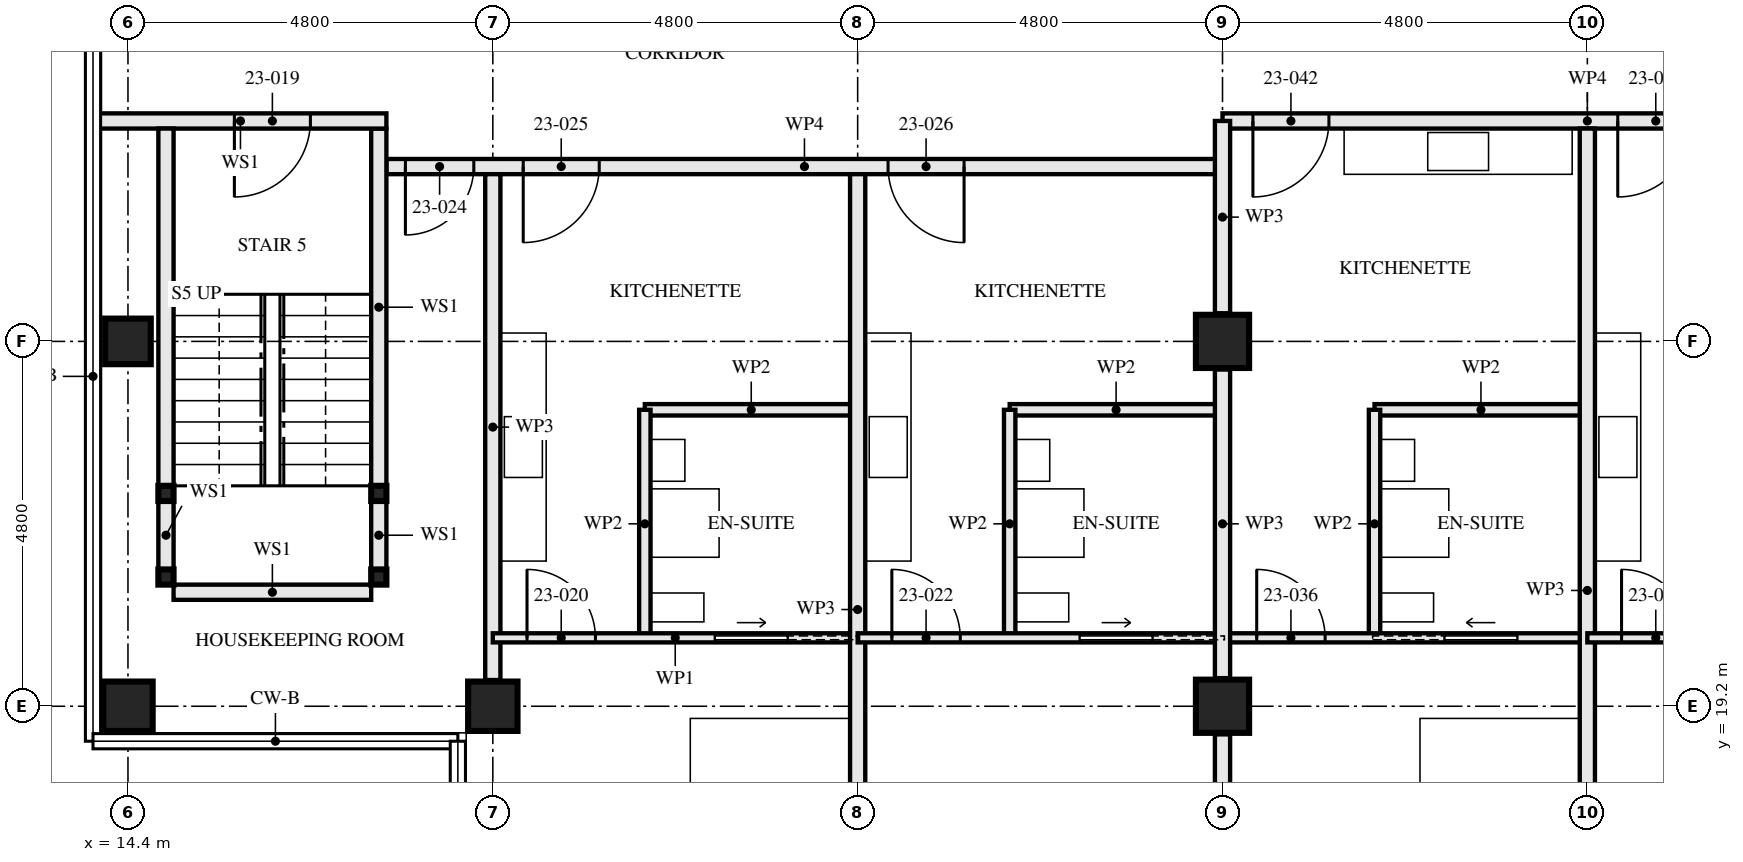
"""IFC4 building model, lengths in metres.
Left out: names, types, materials, properties, quantities, classifications, styles, units other than length and angle.
Written with IfcOpenShell. Run it as: python <this file> out.ifc"""

import sys

from ifc_helpers import new_model, si_unit, direction, frame, frame_2d, origin, origin_2d, place, context, subcontext, project, spatial, rectangle, hollow_rectangle, extrude, element, fill, save


model = new_model("IFC4")
c1 = context("Model", 3, precision=1e-05, world=origin(), true_north=direction((0.0, 1.0)))
c2 = subcontext(c1, "Body", "Model", "MODEL_VIEW")
j1 = project(units=[si_unit("LENGTHUNIT", "METRE"), si_unit("PLANEANGLEUNIT", "RADIAN")], contexts=[c1])
p1 = place(None, origin())
s1 = spatial("IfcSite", under=j1, at=p1, CompositionType="ELEMENT")
p2 = place(p1, origin())
s2 = spatial("IfcBuilding", under=s1, at=p2, CompositionType="ELEMENT")
p3 = place(p2, frame((0.0, 0.0, 87.5)))
s3 = spatial("IfcBuildingStorey", under=s2, at=p3, CompositionType="ELEMENT", Elevation=87.5)
p4 = place(p3, frame((14.4, 19.2, 0.0), z_axis=(0.0, 0.0, 1.0), x_axis=(0.0, 1.0, 0.0)))
e1 = element("IfcColumn", 1, at=p4, inside=s3, PredefinedType="COLUMN", context=c2, shape_type="SweptSolid", body=[
    extrude(hollow_rectangle(XDim=0.65, YDim=0.65, WallThickness=0.08, at=origin_2d()), origin(), (0.0, 0.0, 1.0), 3.5),
])
p5 = place(p3, frame((14.4, 24.0, 0.0), z_axis=(0.0, 0.0, 1.0), x_axis=(1.0, 0.0, 0.0)))
e2 = element("IfcColumn", 2, at=p5, inside=s3, PredefinedType="COLUMN", context=c2, shape_type="SweptSolid", body=[
    extrude(hollow_rectangle(XDim=0.6, YDim=0.6, WallThickness=0.08, at=origin_2d()), origin(), (0.0, 0.0, 1.0), 3.5),
])
p6 = place(p3, frame((19.2, 19.2, 0.0), z_axis=(0.0, 0.0, 1.0), x_axis=(0.0, 1.0, 0.0)))
e3 = element("IfcColumn", 3, at=p6, inside=s3, PredefinedType="COLUMN", context=c2, shape_type="SweptSolid", body=[
    extrude(hollow_rectangle(XDim=0.65, YDim=0.65, WallThickness=0.08, at=origin_2d()), origin(), (0.0, 0.0, 1.0), 3.5),
])
for number, where, z_axis, x_axis in (
    (4, (28.8, 19.2, 0.0), (0.0, 0.0, 1.0), (1.0, 0.0, 0.0)),
    (5, (28.8, 24.0, 0.0), (0.0, 0.0, 1.0), (1.0, 0.0, 0.0)),
):
    element("IfcColumn", number, at=place(p3, frame(where, z_axis=z_axis, x_axis=x_axis)), inside=s3, PredefinedType="COLUMN", context=c2, shape_type="SweptSolid", body=[
        extrude(hollow_rectangle(XDim=0.7, YDim=0.7, WallThickness=0.06, at=origin_2d()), origin(), (0.0, 0.0, 1.0), 3.5),
    ])
for number, where, z_axis, x_axis in (
    (6, (14.9, 20.9, 0.0), (0.0, 0.0, 1.0), (1.0, 0.0, 0.0)),
    (7, (17.7, 20.9, 0.0), (0.0, 0.0, 1.0), (1.0, 0.0, 0.0)),
    (8, (14.9, 22.0, 0.0), (0.0, 0.0, 1.0), (1.0, 0.0, 0.0)),
    (9, (17.7, 22.0, 0.0), (0.0, 0.0, 1.0), (1.0, 0.0, 0.0)),
):
    element("IfcColumn", number, at=place(p3, frame(where, z_axis=z_axis, x_axis=x_axis)), inside=s3, PredefinedType="COLUMN", context=c2, shape_type="SweptSolid", body=[
        extrude(hollow_rectangle(XDim=0.2, YDim=0.2, WallThickness=0.008, at=origin_2d()), origin(), (0.0, 0.0, 1.0), 3.33),
    ])
p7 = place(p3, frame((14.9, 21.0, 0.0), z_axis=(0.0, 0.0, 1.0), x_axis=(0.0, 1.0, 0.0)))
e10 = element("IfcWall", 10, at=p7, inside=s3, PredefinedType="SOLIDWALL", context=c2, shape_type="SweptSolid", body=[
    extrude(rectangle(XDim=0.9, YDim=0.2, at=frame_2d((0.45, 0.0))), origin(), (0.0, 0.0, 1.0), 2.99),
])
p8 = place(p3, frame((14.9, 22.1, 0.0), z_axis=(0.0, 0.0, 1.0), x_axis=(0.0, 1.0, 0.0)))
e11 = element("IfcWall", 11, at=p8, inside=s3, PredefinedType="SOLIDWALL", context=c2, shape_type="SweptSolid", body=[
    extrude(rectangle(XDim=4.7, YDim=0.2, at=frame_2d((2.35, 0.0))), origin(), (0.0, 0.0, 1.0), 2.99),
])
p9 = place(p3, frame((17.7, 21.0, 0.0), z_axis=(0.0, 0.0, 1.0), x_axis=(0.0, 1.0, 0.0)))
e12 = element("IfcWall", 12, at=p9, inside=s3, PredefinedType="SOLIDWALL", context=c2, shape_type="SweptSolid", body=[
    extrude(rectangle(XDim=0.9, YDim=0.2, at=frame_2d((0.45, 0.0))), origin(), (0.0, 0.0, 1.0), 2.99),
])
p10 = place(p3, frame((17.7, 22.1, 0.0), z_axis=(0.0, 0.0, 1.0), x_axis=(0.0, 1.0, 0.0)))
e13 = element("IfcWall", 13, at=p10, inside=s3, PredefinedType="SOLIDWALL", context=c2, shape_type="SweptSolid", body=[
    extrude(rectangle(XDim=4.7, YDim=0.2, at=frame_2d((2.35, 0.0))), origin(), (0.0, 0.0, 1.0), 2.99),
])
p11 = place(p3, frame((15.0, 20.7, 0.0), z_axis=(0.0, 0.0, 1.0), x_axis=(1.0, 0.0, 0.0)))
e14 = element("IfcWall", 14, at=p11, inside=s3, PredefinedType="SOLIDWALL", context=c2, shape_type="SweptSolid", body=[
    extrude(rectangle(XDim=2.6, YDim=0.2, at=frame_2d((1.3, 0.0))), origin(), (0.0, 0.0, 1.0), 3.33),
])
p12 = place(p3, frame((13.96, 26.9, 0.0), z_axis=(0.0, 0.0, 1.0), x_axis=(1.0, 0.0, 0.0)))
e15 = element("IfcWall", 15, at=p12, inside=s3, PredefinedType="SOLIDWALL", context=c2, shape_type="SweptSolid", body=[
    extrude(rectangle(XDim=3.84, YDim=0.2, at=frame_2d((1.92, 0.0))), origin(), (0.0, 0.0, 1.0), 2.32),
])
p13 = place(p12, frame((1.84, 0.0, 0.0)))
e16 = element("IfcOpeningElement", 16, at=p13, cuts=e15, PredefinedType="OPENING", context=c2, shape_type="SweptSolid", body=[
    extrude(rectangle(XDim=1.0, YDim=2.1, at=frame_2d((0.5, 1.05))), frame((0.0, 0.111, 0.0), z_axis=(0.0, -1.0, 0.0), x_axis=(1.0, 0.0, 0.0)), (0.0, 0.0, 1.0), 0.221),
])
p14 = place(p3, frame((19.2, 19.545, 0.0), z_axis=(0.0, 0.0, 1.0), x_axis=(0.0, 1.0, 0.0)))
e17 = element("IfcWall", 17, at=p14, inside=s3, PredefinedType="PARTITIONING", context=c2, shape_type="SweptSolid", body=[
    extrude(rectangle(XDim=6.655, YDim=0.2, at=frame_2d((3.328, 0.0))), origin(), (0.0, 0.0, 1.0), 2.55),
])
p15 = place(p3, frame((21.2, 20.1, 0.0), z_axis=(0.0, 0.0, 1.0), x_axis=(0.0, 1.0, 0.0)))
e18 = element("IfcWall", 18, at=p15, inside=s3, PredefinedType="PARTITIONING", context=c2, shape_type="SweptSolid", body=[
    extrude(rectangle(XDim=3.0, YDim=0.15, at=frame_2d((1.5, 0.0))), origin(), (0.0, 0.0, 1.0), 3.33),
])
p16 = place(p3, frame((21.2, 23.1, 0.0), z_axis=(0.0, 0.0, 1.0), x_axis=(1.0, 0.0, 0.0)))
e19 = element("IfcWall", 19, at=p16, inside=s3, PredefinedType="PARTITIONING", context=c2, shape_type="SweptSolid", body=[
    extrude(rectangle(XDim=2.8, YDim=0.15, at=frame_2d((1.4, 0.0))), origin(), (0.0, 0.0, 1.0), 3.33),
])
p17 = place(p3, frame((19.2, 20.1, 0.0), z_axis=(0.0, 0.0, 1.0), x_axis=(1.0, 0.0, 0.0)))
e20 = element("IfcWall", 20, at=p17, inside=s3, PredefinedType="PARTITIONING", context=c2, shape_type="SweptSolid", body=[
    extrude(rectangle(XDim=4.8, YDim=0.12, at=frame_2d((2.4, 0.0))), origin(), (0.0, 0.0, 1.0), 3.33),
])
p18 = place(p17, frame((0.45, 0.0, 0.0)))
e21 = element("IfcOpeningElement", 21, at=p18, cuts=e20, PredefinedType="OPENING", context=c2, shape_type="SweptSolid", body=[
    extrude(rectangle(XDim=0.9, YDim=2.1, at=frame_2d((0.45, 1.05))), frame((0.0, 0.071, 0.0), z_axis=(0.0, -1.0, 0.0), x_axis=(1.0, 0.0, 0.0)), (0.0, 0.0, 1.0), 0.141),
])
p19 = place(p17, frame((2.925, 0.0, 0.0)))
e22 = element("IfcOpeningElement", 22, at=p19, cuts=e20, PredefinedType="OPENING", context=c2, shape_type="SweptSolid", body=[
    extrude(rectangle(XDim=0.95, YDim=2.1, at=frame_2d((0.475, 1.05))), frame((0.0, 0.071, 0.0), z_axis=(0.0, -1.0, 0.0), x_axis=(1.0, 0.0, 0.0)), (0.0, 0.0, 1.0), 0.141),
])
p20 = place(p3, frame((24.0, 14.745, 0.0), z_axis=(0.0, 0.0, 1.0), x_axis=(0.0, 1.0, 0.0)))
e23 = element("IfcWall", 23, at=p20, inside=s3, PredefinedType="PARTITIONING", context=c2, shape_type="SweptSolid", body=[
    extrude(rectangle(XDim=11.455, YDim=0.2, at=frame_2d((5.728, 0.0))), origin(), (0.0, 0.0, 1.0), 2.55),
])
p21 = place(p3, frame((26.0, 20.1, 0.0), z_axis=(0.0, 0.0, 1.0), x_axis=(0.0, 1.0, 0.0)))
e24 = element("IfcWall", 24, at=p21, inside=s3, PredefinedType="PARTITIONING", context=c2, shape_type="SweptSolid", body=[
    extrude(rectangle(XDim=3.0, YDim=0.15, at=frame_2d((1.5, 0.0))), origin(), (0.0, 0.0, 1.0), 3.33),
])
p22 = place(p3, frame((26.0, 23.1, 0.0), z_axis=(0.0, 0.0, 1.0), x_axis=(1.0, 0.0, 0.0)))
e25 = element("IfcWall", 25, at=p22, inside=s3, PredefinedType="PARTITIONING", context=c2, shape_type="SweptSolid", body=[
    extrude(rectangle(XDim=2.8, YDim=0.15, at=frame_2d((1.4, 0.0))), origin(), (0.0, 0.0, 1.0), 3.33),
])
p23 = place(p3, frame((24.0, 20.1, 0.0), z_axis=(0.0, 0.0, 1.0), x_axis=(1.0, 0.0, 0.0)))
e26 = element("IfcWall", 26, at=p23, inside=s3, PredefinedType="PARTITIONING", context=c2, shape_type="SweptSolid", body=[
    extrude(rectangle(XDim=4.8, YDim=0.12, at=frame_2d((2.4, 0.0))), origin(), (0.0, 0.0, 1.0), 3.33),
])
p24 = place(p23, frame((0.45, 0.0, 0.0)))
e27 = element("IfcOpeningElement", 27, at=p24, cuts=e26, PredefinedType="OPENING", context=c2, shape_type="SweptSolid", body=[
    extrude(rectangle(XDim=0.9, YDim=2.1, at=frame_2d((0.45, 1.05))), frame((0.0, 0.071, 0.0), z_axis=(0.0, -1.0, 0.0), x_axis=(1.0, 0.0, 0.0)), (0.0, 0.0, 1.0), 0.141),
])
p25 = place(p23, frame((2.925, 0.0, 0.0)))
e28 = element("IfcOpeningElement", 28, at=p25, cuts=e26, PredefinedType="OPENING", context=c2, shape_type="SweptSolid", body=[
    extrude(rectangle(XDim=0.95, YDim=2.1, at=frame_2d((0.475, 1.05))), frame((0.0, 0.071, 0.0), z_axis=(0.0, -1.0, 0.0), x_axis=(1.0, 0.0, 0.0)), (0.0, 0.0, 1.0), 0.141),
])
p26 = place(p3, frame((17.8, 26.3, 0.0), z_axis=(0.0, 0.0, 1.0), x_axis=(1.0, 0.0, 0.0)))
e29 = element("IfcWall", 29, at=p26, inside=s3, PredefinedType="PARTITIONING", context=c2, shape_type="SweptSolid", body=[
    extrude(rectangle(XDim=11.0, YDim=0.2, at=frame_2d((5.5, 0.0))), origin(), (0.0, 0.0, 1.0), 2.55),
])
p27 = place(p26, frame((0.25, 0.0, 0.0)))
e30 = element("IfcOpeningElement", 30, at=p27, cuts=e29, PredefinedType="OPENING", context=c2, shape_type="SweptSolid", body=[
    extrude(rectangle(XDim=0.9, YDim=2.1, at=frame_2d((0.45, 1.05))), frame((0.0, 0.111, 0.0), z_axis=(0.0, -1.0, 0.0), x_axis=(1.0, 0.0, 0.0)), (0.0, 0.0, 1.0), 0.221),
])
p28 = place(p26, frame((1.8, 0.0, 0.0)))
e31 = element("IfcOpeningElement", 31, at=p28, cuts=e29, PredefinedType="OPENING", context=c2, shape_type="SweptSolid", body=[
    extrude(rectangle(XDim=1.0, YDim=2.1, at=frame_2d((0.5, 1.05))), frame((0.0, 0.111, 0.0), z_axis=(0.0, -1.0, 0.0), x_axis=(1.0, 0.0, 0.0)), (0.0, 0.0, 1.0), 0.221),
])
p29 = place(p26, frame((6.6, 0.0, 0.0)))
e32 = element("IfcOpeningElement", 32, at=p29, cuts=e29, PredefinedType="OPENING", context=c2, shape_type="SweptSolid", body=[
    extrude(rectangle(XDim=1.0, YDim=2.1, at=frame_2d((0.5, 1.05))), frame((0.0, 0.111, 0.0), z_axis=(0.0, -1.0, 0.0), x_axis=(1.0, 0.0, 0.0)), (0.0, 0.0, 1.0), 0.221),
])
p30 = place(p3, frame((30.8, 20.1, 0.0), z_axis=(0.0, 0.0, 1.0), x_axis=(0.0, 1.0, 0.0)))
e33 = element("IfcWall", 33, at=p30, inside=s3, PredefinedType="PARTITIONING", context=c2, shape_type="SweptSolid", body=[
    extrude(rectangle(XDim=3.0, YDim=0.15, at=frame_2d((1.5, 0.0))), origin(), (0.0, 0.0, 1.0), 3.33),
])
p31 = place(p3, frame((30.8, 23.1, 0.0), z_axis=(0.0, 0.0, 1.0), x_axis=(1.0, 0.0, 0.0)))
e34 = element("IfcWall", 34, at=p31, inside=s3, PredefinedType="PARTITIONING", context=c2, shape_type="SweptSolid", body=[
    extrude(rectangle(XDim=2.8, YDim=0.15, at=frame_2d((1.4, 0.0))), origin(), (0.0, 0.0, 1.0), 3.33),
])
p32 = place(p3, frame((28.8, 20.1, 0.0), z_axis=(0.0, 0.0, 1.0), x_axis=(1.0, 0.0, 0.0)))
e35 = element("IfcWall", 35, at=p32, inside=s3, PredefinedType="PARTITIONING", context=c2, shape_type="SweptSolid", body=[
    extrude(rectangle(XDim=4.8, YDim=0.12, at=frame_2d((2.4, 0.0))), origin(), (0.0, 0.0, 1.0), 3.33),
])
p33 = place(p32, frame((0.45, 0.0, 0.0)))
e36 = element("IfcOpeningElement", 36, at=p33, cuts=e35, PredefinedType="OPENING", context=c2, shape_type="SweptSolid", body=[
    extrude(rectangle(XDim=0.9, YDim=2.1, at=frame_2d((0.45, 1.05))), frame((0.0, 0.071, 0.0), z_axis=(0.0, -1.0, 0.0), x_axis=(1.0, 0.0, 0.0)), (0.0, 0.0, 1.0), 0.141),
])
p34 = place(p32, frame((2.925, 0.0, 0.0)))
e37 = element("IfcOpeningElement", 37, at=p34, cuts=e35, PredefinedType="OPENING", context=c2, shape_type="SweptSolid", body=[
    extrude(rectangle(XDim=0.95, YDim=2.1, at=frame_2d((0.475, 1.05))), frame((0.0, 0.071, 0.0), z_axis=(0.0, -1.0, 0.0), x_axis=(1.0, 0.0, 0.0)), (0.0, 0.0, 1.0), 0.141),
])
p35 = place(p3, frame((33.6, 14.647, 0.0), z_axis=(0.0, 0.0, 1.0), x_axis=(0.0, 1.0, 0.0)))
e38 = element("IfcWall", 38, at=p35, inside=s3, PredefinedType="PARTITIONING", context=c2, shape_type="SweptSolid", body=[
    extrude(rectangle(XDim=12.153, YDim=0.2, at=frame_2d((6.077, 0.0))), origin(), (0.0, 0.0, 1.0), 2.55),
])
p36 = place(p3, frame((33.6, 20.1, 0.0), z_axis=(0.0, 0.0, 1.0), x_axis=(1.0, 0.0, 0.0)))
e39 = element("IfcWall", 39, at=p36, inside=s3, PredefinedType="PARTITIONING", context=c2, shape_type="SweptSolid", body=[
    extrude(rectangle(XDim=4.8, YDim=0.12, at=frame_2d((2.4, 0.0))), origin(), (0.0, 0.0, 1.0), 3.33),
])
p37 = place(p36, frame((0.45, 0.0, 0.0)))
e40 = element("IfcOpeningElement", 40, at=p37, cuts=e39, PredefinedType="OPENING", context=c2, shape_type="SweptSolid", body=[
    extrude(rectangle(XDim=0.9, YDim=2.1, at=frame_2d((0.45, 1.05))), frame((0.0, 0.071, 0.0), z_axis=(0.0, -1.0, 0.0), x_axis=(1.0, 0.0, 0.0)), (0.0, 0.0, 1.0), 0.141),
])
p38 = place(p36, frame((2.925, 0.0, 0.0)))
e41 = element("IfcOpeningElement", 41, at=p38, cuts=e39, PredefinedType="OPENING", context=c2, shape_type="SweptSolid", body=[
    extrude(rectangle(XDim=0.95, YDim=2.1, at=frame_2d((0.475, 1.05))), frame((0.0, 0.071, 0.0), z_axis=(0.0, -1.0, 0.0), x_axis=(1.0, 0.0, 0.0)), (0.0, 0.0, 1.0), 0.141),
])
p39 = place(p3, frame((28.8, 26.9, 0.0), z_axis=(0.0, 0.0, 1.0), x_axis=(1.0, 0.0, 0.0)))
e42 = element("IfcWall", 42, at=p39, inside=s3, PredefinedType="PARTITIONING", context=c2, shape_type="SweptSolid", body=[
    extrude(rectangle(XDim=9.6, YDim=0.2, at=frame_2d((4.8, 0.0))), origin(), (0.0, 0.0, 1.0), 3.33),
])
p40 = place(p39, frame((0.4, 0.0, 0.0)))
e43 = element("IfcOpeningElement", 43, at=p40, cuts=e42, PredefinedType="OPENING", context=c2, shape_type="SweptSolid", body=[
    extrude(rectangle(XDim=1.0, YDim=2.1, at=frame_2d((0.5, 1.05))), frame((0.0, 0.111, 0.0), z_axis=(0.0, -1.0, 0.0), x_axis=(1.0, 0.0, 0.0)), (0.0, 0.0, 1.0), 0.221),
])
p41 = place(p39, frame((5.2, 0.0, 0.0)))
e44 = element("IfcOpeningElement", 44, at=p41, cuts=e42, PredefinedType="OPENING", context=c2, shape_type="SweptSolid", body=[
    extrude(rectangle(XDim=1.0, YDim=2.1, at=frame_2d((0.5, 1.05))), frame((0.0, 0.111, 0.0), z_axis=(0.0, -1.0, 0.0), x_axis=(1.0, 0.0, 0.0)), (0.0, 0.0, 1.0), 0.221),
])
p42 = place(p3, frame((28.8, 14.647, 0.0), z_axis=(0.0, 0.0, 1.0), x_axis=(0.0, 1.0, 0.0)))
e45 = element("IfcWall", 45, at=p42, inside=s3, PredefinedType="PARTITIONING", context=c2, shape_type="SweptSolid", body=[
    extrude(rectangle(XDim=4.183, YDim=0.2, at=frame_2d((2.092, 0.0))), origin(), (0.0, 0.0, 1.0), 2.32),
])
p43 = place(p3, frame((28.8, 19.57, 0.0), z_axis=(0.0, 0.0, 1.0), x_axis=(0.0, 1.0, 0.0)))
e46 = element("IfcWall", 46, at=p43, inside=s3, PredefinedType="PARTITIONING", context=c2, shape_type="SweptSolid", body=[
    extrude(rectangle(XDim=4.06, YDim=0.2, at=frame_2d((2.03, 0.0))), origin(), (0.0, 0.0, 1.0), 2.32),
])
p44 = place(p3, frame((28.8, 24.37, 0.0), z_axis=(0.0, 0.0, 1.0), x_axis=(0.0, 1.0, 0.0)))
e47 = element("IfcWall", 47, at=p44, inside=s3, PredefinedType="PARTITIONING", context=c2, shape_type="SweptSolid", body=[
    extrude(rectangle(XDim=2.53, YDim=0.2, at=frame_2d((1.265, 0.0))), origin(), (0.0, 0.0, 1.0), 2.32),
])
p45 = place(p13, frame((1.0, 0.0, 0.0), z_axis=(0.0, 0.0, 1.0), x_axis=(-1.0, 0.0, 0.0)))
e48 = element("IfcDoor", 48, at=p45, inside=s3, OperationType="SINGLE_SWING_LEFT", PredefinedType="DOOR", context=c2, shape_type="SweptSolid", body=[
    extrude(rectangle(XDim=1.0, YDim=2.1, at=frame_2d((0.5, 1.05))), frame((0.0, 0.032, 0.0), z_axis=(0.0, -1.0, 0.0), x_axis=(1.0, 0.0, 0.0)), (0.0, 0.0, 1.0), 0.064),
])
fill(e16, e48)
p46 = place(p18, origin())
e49 = element("IfcDoor", 49, at=p46, inside=s3, OperationType="SINGLE_SWING_RIGHT", PredefinedType="DOOR", context=c2, shape_type="SweptSolid", body=[
    extrude(rectangle(XDim=0.9, YDim=2.1, at=frame_2d((0.45, 1.05))), frame((0.0, 0.022, 0.0), z_axis=(0.0, -1.0, 0.0), x_axis=(1.0, 0.0, 0.0)), (0.0, 0.0, 1.0), 0.044),
])
fill(e21, e49)
p47 = place(p19, origin())
e50 = element("IfcDoor", 50, at=p47, inside=s3, OperationType="SLIDING_TO_LEFT", PredefinedType="DOOR", context=c2, shape_type="SweptSolid", body=[
    extrude(rectangle(XDim=0.95, YDim=2.1, at=frame_2d((0.475, 1.05))), frame((0.0, 0.022, 0.0), z_axis=(0.0, -1.0, 0.0), x_axis=(1.0, 0.0, 0.0)), (0.0, 0.0, 1.0), 0.044),
])
fill(e22, e50)
p48 = place(p24, origin())
e51 = element("IfcDoor", 51, at=p48, inside=s3, OperationType="SINGLE_SWING_RIGHT", PredefinedType="DOOR", context=c2, shape_type="SweptSolid", body=[
    extrude(rectangle(XDim=0.9, YDim=2.1, at=frame_2d((0.45, 1.05))), frame((0.0, 0.022, 0.0), z_axis=(0.0, -1.0, 0.0), x_axis=(1.0, 0.0, 0.0)), (0.0, 0.0, 1.0), 0.044),
])
fill(e27, e51)
p49 = place(p25, origin())
e52 = element("IfcDoor", 52, at=p49, inside=s3, OperationType="SLIDING_TO_LEFT", PredefinedType="DOOR", context=c2, shape_type="SweptSolid", body=[
    extrude(rectangle(XDim=0.95, YDim=2.1, at=frame_2d((0.475, 1.05))), frame((0.0, 0.022, 0.0), z_axis=(0.0, -1.0, 0.0), x_axis=(1.0, 0.0, 0.0)), (0.0, 0.0, 1.0), 0.044),
])
fill(e28, e52)
p50 = place(p27, frame((0.9, 0.0, 0.0), z_axis=(0.0, 0.0, 1.0), x_axis=(-1.0, 0.0, 0.0)))
e53 = element("IfcDoor", 53, at=p50, inside=s3, OperationType="SINGLE_SWING_LEFT", PredefinedType="DOOR", context=c2, shape_type="SweptSolid", body=[
    extrude(rectangle(XDim=0.9, YDim=2.1, at=frame_2d((0.45, 1.05))), frame((0.0, 0.027, 0.0), z_axis=(0.0, -1.0, 0.0), x_axis=(1.0, 0.0, 0.0)), (0.0, 0.0, 1.0), 0.054),
])
fill(e30, e53)
p51 = place(p28, frame((1.0, 0.0, 0.0), z_axis=(0.0, 0.0, 1.0), x_axis=(-1.0, 0.0, 0.0)))
e54 = element("IfcDoor", 54, at=p51, inside=s3, OperationType="SINGLE_SWING_LEFT", PredefinedType="DOOR", context=c2, shape_type="SweptSolid", body=[
    extrude(rectangle(XDim=1.0, YDim=2.1, at=frame_2d((0.5, 1.05))), frame((0.0, 0.027, 0.0), z_axis=(0.0, -1.0, 0.0), x_axis=(1.0, 0.0, 0.0)), (0.0, 0.0, 1.0), 0.054),
])
fill(e31, e54)
p52 = place(p29, frame((1.0, 0.0, 0.0), z_axis=(0.0, 0.0, 1.0), x_axis=(-1.0, 0.0, 0.0)))
e55 = element("IfcDoor", 55, at=p52, inside=s3, OperationType="SINGLE_SWING_RIGHT", PredefinedType="DOOR", context=c2, shape_type="SweptSolid", body=[
    extrude(rectangle(XDim=1.0, YDim=2.1, at=frame_2d((0.5, 1.05))), frame((0.0, 0.027, 0.0), z_axis=(0.0, -1.0, 0.0), x_axis=(1.0, 0.0, 0.0)), (0.0, 0.0, 1.0), 0.054),
])
fill(e32, e55)
p53 = place(p33, origin())
e56 = element("IfcDoor", 56, at=p53, inside=s3, OperationType="SINGLE_SWING_RIGHT", PredefinedType="DOOR", context=c2, shape_type="SweptSolid", body=[
    extrude(rectangle(XDim=0.9, YDim=2.1, at=frame_2d((0.45, 1.05))), frame((0.0, 0.022, 0.0), z_axis=(0.0, -1.0, 0.0), x_axis=(1.0, 0.0, 0.0)), (0.0, 0.0, 1.0), 0.044),
])
fill(e36, e56)
p54 = place(p34, origin())
e57 = element("IfcDoor", 57, at=p54, inside=s3, OperationType="SLIDING_TO_RIGHT", PredefinedType="DOOR", context=c2, shape_type="SweptSolid", body=[
    extrude(rectangle(XDim=0.95, YDim=2.1, at=frame_2d((0.475, 1.05))), frame((0.0, 0.022, 0.0), z_axis=(0.0, -1.0, 0.0), x_axis=(1.0, 0.0, 0.0)), (0.0, 0.0, 1.0), 0.044),
])
fill(e37, e57)
p55 = place(p37, origin())
e58 = element("IfcDoor", 58, at=p55, inside=s3, OperationType="SINGLE_SWING_RIGHT", PredefinedType="DOOR", context=c2, shape_type="SweptSolid", body=[
    extrude(rectangle(XDim=0.9, YDim=2.1, at=frame_2d((0.45, 1.05))), frame((0.0, 0.022, 0.0), z_axis=(0.0, -1.0, 0.0), x_axis=(1.0, 0.0, 0.0)), (0.0, 0.0, 1.0), 0.044),
])
fill(e40, e58)
p56 = place(p40, frame((1.0, 0.0, 0.0), z_axis=(0.0, 0.0, 1.0), x_axis=(-1.0, 0.0, 0.0)))
e59 = element("IfcDoor", 59, at=p56, inside=s3, OperationType="SINGLE_SWING_LEFT", PredefinedType="DOOR", context=c2, shape_type="SweptSolid", body=[
    extrude(rectangle(XDim=1.0, YDim=2.1, at=frame_2d((0.5, 1.05))), frame((0.0, 0.027, 0.0), z_axis=(0.0, -1.0, 0.0), x_axis=(1.0, 0.0, 0.0)), (0.0, 0.0, 1.0), 0.054),
])
fill(e43, e59)
p57 = place(p41, frame((1.0, 0.0, 0.0), z_axis=(0.0, 0.0, 1.0), x_axis=(-1.0, 0.0, 0.0)))
e60 = element("IfcDoor", 60, at=p57, inside=s3, OperationType="SINGLE_SWING_LEFT", PredefinedType="DOOR", context=c2, shape_type="SweptSolid", body=[
    extrude(rectangle(XDim=1.0, YDim=2.1, at=frame_2d((0.5, 1.05))), frame((0.0, 0.027, 0.0), z_axis=(0.0, -1.0, 0.0), x_axis=(1.0, 0.0, 0.0)), (0.0, 0.0, 1.0), 0.054),
])
fill(e44, e60)
save(model, sys.argv[1])
